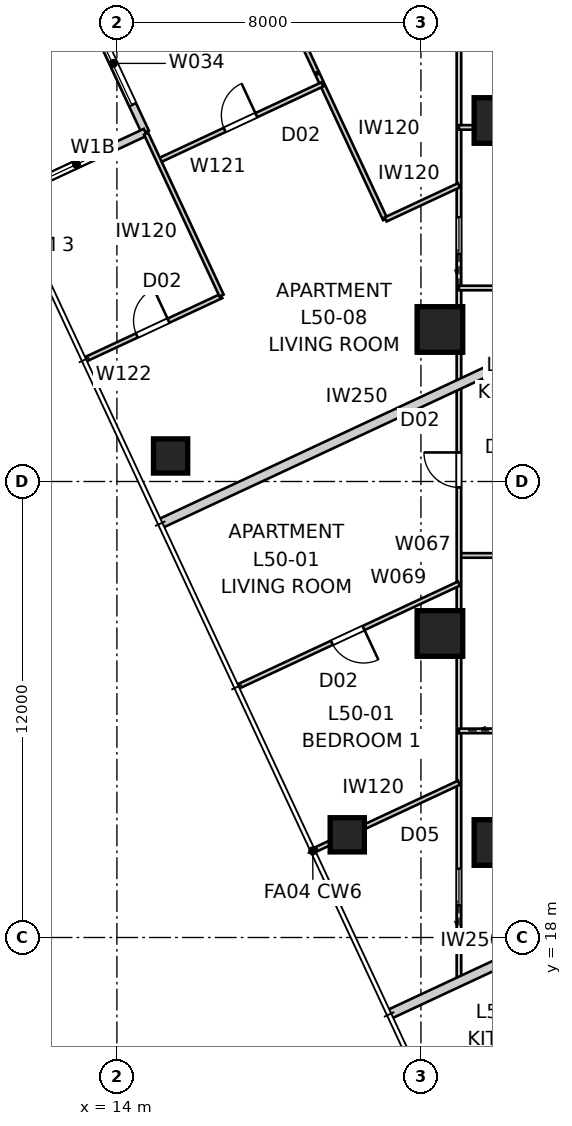
"""IFC4 building model, lengths in metres.
Left out: names, types, materials, properties, quantities, classifications, styles, units other than length and angle.
Written with IfcOpenShell. Run it as: python <this file> out.ifc"""

import sys

from ifc_helpers import new_model, si_unit, direction, frame, frame_2d, origin, origin_2d, place, context, subcontext, project, spatial, rectangle, extrude, element, fill, save


model = new_model("IFC4")
c1 = context("Model", 3, precision=1e-05, world=origin(), true_north=direction((0.0, 1.0)))
c2 = subcontext(c1, "Body", "Model", "MODEL_VIEW")
j1 = project(units=[si_unit("LENGTHUNIT", "METRE"), si_unit("PLANEANGLEUNIT", "RADIAN")], contexts=[c1])
p1 = place(None, origin())
s1 = spatial("IfcSite", under=j1, at=p1, CompositionType="ELEMENT")
p2 = place(p1, origin())
s2 = spatial("IfcBuilding", under=s1, at=p2, CompositionType="ELEMENT")
p3 = place(p2, frame((0.0, 0.0, 182.8)))
s3 = spatial("IfcBuildingStorey", under=s2, at=p3, CompositionType="ELEMENT", Elevation=182.8)
for number, where, z_axis, x_axis in (
    (1, (15.412, 30.672, 0.0), (0.0, 0.0, 1.0), (1.0, 0.0, 0.0)),
    (2, (20.061, 20.702, 0.0), (0.0, 0.0, 1.0), (1.0, 0.0, 0.0)),
):
    element("IfcColumn", number, at=place(p3, frame(where, z_axis=z_axis, x_axis=x_axis)), inside=s3, PredefinedType="COLUMN", context=c2, shape_type="SweptSolid", body=[
        extrude(rectangle(XDim=0.9, YDim=0.9, at=origin_2d()), origin(), (0.0, 0.0, 1.0), 3.4),
    ])
for number, where, z_axis, x_axis in (
    (3, (24.0, 39.5, 0.0), (0.0, 0.0, 1.0), (1.0, 0.0, 0.0)),
    (4, (22.5, 34.0, 0.0), (0.0, 0.0, 1.0), (1.0, 0.0, 0.0)),
    (5, (22.5, 26.0, 0.0), (0.0, 0.0, 1.0), (1.0, 0.0, 0.0)),
    (6, (24.0, 20.5, 0.0), (0.0, 0.0, 1.0), (1.0, 0.0, 0.0)),
):
    element("IfcColumn", number, at=place(p3, frame(where, z_axis=z_axis, x_axis=x_axis)), inside=s3, PredefinedType="COLUMN", context=c2, shape_type="SweptSolid", body=[
        extrude(rectangle(XDim=1.2, YDim=1.2, at=origin_2d()), origin(), (0.0, 0.0, 1.0), 3.4),
    ])
p4 = place(p3, frame((13.06, 42.815, 0.0), z_axis=(0.0, 0.0, 1.0), x_axis=(0.422658246362, -0.906289140828, 0.0)))
e7 = element("IfcWall", 7, at=p4, inside=s3, PredefinedType="SOLIDWALL", context=c2, shape_type="SweptSolid", body=[
    extrude(rectangle(XDim=4.0, YDim=0.2, at=frame_2d((2.0, 0.0))), origin(), (0.0, 0.0, 1.0), 3.25),
])
p5 = place(p4, frame((0.8, 0.0, 0.0)))
e8 = element("IfcOpeningElement", 8, at=p5, cuts=e7, PredefinedType="OPENING", context=c2, shape_type="SweptSolid", body=[
    extrude(rectangle(XDim=2.4, YDim=2.1, at=frame_2d((1.2, 1.05))), frame((0.0, 0.11, 0.0), z_axis=(0.0, -1.0, 0.0), x_axis=(1.0, 0.0, 0.0)), (0.0, 0.0, 1.0), 0.22),
])
p6 = place(p3, frame((14.75, 39.19, 0.0), z_axis=(0.0, 0.0, 1.0), x_axis=(-0.906289140828, -0.422658246362, 0.0)))
e9 = element("IfcWall", 9, at=p6, inside=s3, PredefinedType="SOLIDWALL", context=c2, shape_type="SweptSolid", body=[
    extrude(rectangle(XDim=4.0, YDim=0.2, at=frame_2d((2.0, 0.0))), origin(), (0.0, 0.0, 1.0), 3.25),
])
p7 = place(p6, frame((1.0, 0.0, 0.45)))
e10 = element("IfcOpeningElement", 10, at=p7, cuts=e9, PredefinedType="OPENING", context=c2, shape_type="SweptSolid", body=[
    extrude(rectangle(XDim=2.0, YDim=1.8, at=frame_2d((1.0, 0.9))), frame((0.0, 0.11, 0.0), z_axis=(0.0, -1.0, 0.0), x_axis=(1.0, 0.0, 0.0)), (0.0, 0.0, 1.0), 0.22),
])
p8 = place(p3, frame((15.14, 28.89, 0.0), z_axis=(0.0, 0.0, 1.0), x_axis=(0.906303906082, 0.422626584374, 0.0)))
e11 = element("IfcWall", 11, at=p8, inside=s3, PredefinedType="PARTITIONING", context=c2, shape_type="SweptSolid", body=[
    extrude(rectangle(XDim=12.185, YDim=0.25, at=frame_2d((6.092, 0.0))), origin(), (0.0, 0.0, 1.0), 3.25),
])
p9 = place(p3, frame((21.162, 15.975, 0.0), z_axis=(0.0, 0.0, 1.0), x_axis=(0.906309193024, 0.422615246577, 0.0)))
e12 = element("IfcWall", 12, at=p9, inside=s3, PredefinedType="PARTITIONING", context=c2, shape_type="SweptSolid", body=[
    extrude(rectangle(XDim=5.54, YDim=0.25, at=frame_2d((2.77, 0.0))), origin(), (0.0, 0.0, 1.0), 3.25),
])
p10 = place(p3, frame((26.2, 28.054, 0.0), z_axis=(0.0, 0.0, 1.0), x_axis=(-1.0, 0.0, 0.0)))
e13 = element("IfcWall", 13, at=p10, inside=s3, PredefinedType="PARTITIONING", context=c2, shape_type="SweptSolid", body=[
    extrude(rectangle(XDim=3.2, YDim=0.12, at=frame_2d((1.6, 0.0))), origin(), (0.0, 0.0, 1.0), 3.25),
])
p11 = place(p10, frame((1.12, 0.0, 0.0)))
e14 = element("IfcOpeningElement", 14, at=p11, cuts=e13, PredefinedType="OPENING", context=c2, shape_type="SweptSolid", body=[
    extrude(rectangle(XDim=0.96, YDim=2.1, at=frame_2d((0.48, 1.05))), frame((0.0, 0.07, 0.0), z_axis=(0.0, -1.0, 0.0), x_axis=(1.0, 0.0, 0.0)), (0.0, 0.0, 1.0), 0.14),
])
p12 = place(p3, frame((23.0, 16.832, 0.0), z_axis=(0.0, 0.0, 1.0), x_axis=(0.0, 1.0, 0.0)))
e15 = element("IfcWall", 15, at=p12, inside=s3, PredefinedType="PARTITIONING", context=c2, shape_type="SweptSolid", body=[
    extrude(rectangle(XDim=30.574, YDim=0.12, at=frame_2d((15.287, 0.0))), origin(), (0.0, 0.0, 1.0), 2.55),
])
p13 = place(p12, frame((26.093, 0.0, 0.0)))
e16 = element("IfcOpeningElement", 16, at=p13, cuts=e15, PredefinedType="OPENING", context=c2, shape_type="SweptSolid", body=[
    extrude(rectangle(XDim=0.92, YDim=2.34, at=frame_2d((0.46, 1.17))), frame((0.0, 0.07, 0.0), z_axis=(0.0, -1.0, 0.0), x_axis=(1.0, 0.0, 0.0)), (0.0, 0.0, 1.0), 0.14),
])
p14 = place(p12, frame((13.012, 0.0, 0.0)))
e17 = element("IfcOpeningElement", 17, at=p14, cuts=e15, PredefinedType="OPENING", context=c2, shape_type="SweptSolid", body=[
    extrude(rectangle(XDim=0.92, YDim=2.34, at=frame_2d((0.46, 1.17))), frame((0.0, 0.07, 0.0), z_axis=(0.0, -1.0, 0.0), x_axis=(1.0, 0.0, 0.0)), (0.0, 0.0, 1.0), 0.14),
])
p15 = place(p12, frame((19.16, 0.0, 0.0)))
e18 = element("IfcOpeningElement", 18, at=p15, cuts=e15, PredefinedType="OPENING", context=c2, shape_type="SweptSolid", body=[
    extrude(rectangle(XDim=0.96, YDim=2.1, at=frame_2d((0.48, 1.05))), frame((0.0, 0.07, 0.0), z_axis=(0.0, -1.0, 0.0), x_axis=(1.0, 0.0, 0.0)), (0.0, 0.0, 1.0), 0.14),
])
p16 = place(p12, frame((2.018, 0.0, 0.0)))
e19 = element("IfcOpeningElement", 19, at=p16, cuts=e15, PredefinedType="OPENING", context=c2, shape_type="SweptSolid", body=[
    extrude(rectangle(XDim=0.96, YDim=2.1, at=frame_2d((0.48, 1.05))), frame((0.0, 0.07, 0.0), z_axis=(0.0, -1.0, 0.0), x_axis=(1.0, 0.0, 0.0)), (0.0, 0.0, 1.0), 0.14),
])
p17 = place(p3, frame((23.0, 23.436, 0.0), z_axis=(0.0, 0.0, 1.0), x_axis=(1.0, 0.0, 0.0)))
e20 = element("IfcWall", 20, at=p17, inside=s3, PredefinedType="PARTITIONING", context=c2, shape_type="SweptSolid", body=[
    extrude(rectangle(XDim=3.2, YDim=0.12, at=frame_2d((1.6, 0.0))), origin(), (0.0, 0.0, 1.0), 3.25),
])
p18 = place(p17, frame((1.12, 0.0, 0.0)))
e21 = element("IfcOpeningElement", 21, at=p18, cuts=e20, PredefinedType="OPENING", context=c2, shape_type="SweptSolid", body=[
    extrude(rectangle(XDim=0.96, YDim=2.1, at=frame_2d((0.48, 1.05))), frame((0.0, 0.07, 0.0), z_axis=(0.0, -1.0, 0.0), x_axis=(1.0, 0.0, 0.0)), (0.0, 0.0, 1.0), 0.14),
])
p19 = place(p3, frame((23.0, 27.314, 0.0), z_axis=(0.0, 0.0, 1.0), x_axis=(-0.906305562553, -0.422623032129, 0.0)))
e22 = element("IfcWall", 22, at=p19, inside=s3, PredefinedType="PARTITIONING", context=c2, shape_type="SweptSolid", body=[
    extrude(rectangle(XDim=6.417, YDim=0.12, at=frame_2d((3.209, 0.0))), origin(), (0.0, 0.0, 1.0), 3.25),
])
p20 = place(p19, frame((2.769, 0.0, 0.0)))
e23 = element("IfcOpeningElement", 23, at=p20, cuts=e22, PredefinedType="OPENING", context=c2, shape_type="SweptSolid", body=[
    extrude(rectangle(XDim=0.92, YDim=2.34, at=frame_2d((0.46, 1.17))), frame((0.0, 0.07, 0.0), z_axis=(0.0, -1.0, 0.0), x_axis=(1.0, 0.0, 0.0)), (0.0, 0.0, 1.0), 0.14),
])
p21 = place(p3, frame((23.0, 22.073, 0.0), z_axis=(0.0, 0.0, 1.0), x_axis=(-0.906304800396, -0.422624666552, 0.0)))
e24 = element("IfcWall", 24, at=p21, inside=s3, PredefinedType="PARTITIONING", context=c2, shape_type="SweptSolid", body=[
    extrude(rectangle(XDim=4.203, YDim=0.12, at=frame_2d((2.101, 0.0))), origin(), (0.0, 0.0, 1.0), 3.25),
])
p22 = place(p3, frame((26.2, 39.318, 0.0), z_axis=(0.0, 0.0, 1.0), x_axis=(-1.0, 0.0, 0.0)))
e25 = element("IfcWall", 25, at=p22, inside=s3, PredefinedType="PARTITIONING", context=c2, shape_type="SweptSolid", body=[
    extrude(rectangle(XDim=3.2, YDim=0.12, at=frame_2d((1.6, 0.0))), origin(), (0.0, 0.0, 1.0), 3.25),
])
p23 = place(p22, frame((0.52, 0.0, 0.0)))
e26 = element("IfcOpeningElement", 26, at=p23, cuts=e25, PredefinedType="OPENING", context=c2, shape_type="SweptSolid", body=[
    extrude(rectangle(XDim=0.96, YDim=2.1, at=frame_2d((0.48, 1.05))), frame((0.0, 0.07, 0.0), z_axis=(0.0, -1.0, 0.0), x_axis=(1.0, 0.0, 0.0)), (0.0, 0.0, 1.0), 0.14),
])
p24 = place(p3, frame((26.2, 35.092, 0.0), z_axis=(0.0, 0.0, 1.0), x_axis=(-1.0, 0.0, 0.0)))
e27 = element("IfcWall", 27, at=p24, inside=s3, PredefinedType="PARTITIONING", context=c2, shape_type="SweptSolid", body=[
    extrude(rectangle(XDim=3.2, YDim=0.12, at=frame_2d((1.6, 0.0))), origin(), (0.0, 0.0, 1.0), 3.25),
])
p25 = place(p24, frame((1.12, 0.0, 0.0)))
e28 = element("IfcOpeningElement", 28, at=p25, cuts=e27, PredefinedType="OPENING", context=c2, shape_type="SweptSolid", body=[
    extrude(rectangle(XDim=0.96, YDim=2.1, at=frame_2d((0.48, 1.05))), frame((0.0, 0.07, 0.0), z_axis=(0.0, -1.0, 0.0), x_axis=(1.0, 0.0, 0.0)), (0.0, 0.0, 1.0), 0.14),
])
p26 = place(p3, frame((19.279, 40.718, 0.0), z_axis=(0.0, 0.0, 1.0), x_axis=(0.422625167194, -0.906304566939, 0.0)))
e29 = element("IfcWall", 29, at=p26, inside=s3, PredefinedType="PARTITIONING", context=c2, shape_type="SweptSolid", body=[
    extrude(rectangle(XDim=4.211, YDim=0.12, at=frame_2d((2.105, 0.0))), origin(), (0.0, 0.0, 1.0), 3.25),
])
p27 = place(p3, frame((21.072, 36.897, 0.0), z_axis=(0.0, 0.0, 1.0), x_axis=(0.90630329877, 0.422627886727, 0.0)))
e30 = element("IfcWall", 30, at=p27, inside=s3, PredefinedType="PARTITIONING", context=c2, shape_type="SweptSolid", body=[
    extrude(rectangle(XDim=2.128, YDim=0.12, at=frame_2d((1.064, 0.0))), origin(), (0.0, 0.0, 1.0), 3.25),
])
p28 = place(p3, frame((15.099, 38.442, 0.0), z_axis=(0.0, 0.0, 1.0), x_axis=(0.906306539388, 0.422620937321, 0.0)))
e31 = element("IfcWall", 31, at=p28, inside=s3, PredefinedType="PARTITIONING", context=c2, shape_type="SweptSolid", body=[
    extrude(rectangle(XDim=4.75, YDim=0.12, at=frame_2d((2.375, 0.0))), origin(), (0.0, 0.0, 1.0), 3.25),
])
p29 = place(p28, frame((1.915, 0.0, 0.0)))
e32 = element("IfcOpeningElement", 32, at=p29, cuts=e31, PredefinedType="OPENING", context=c2, shape_type="SweptSolid", body=[
    extrude(rectangle(XDim=0.92, YDim=2.34, at=frame_2d((0.46, 1.17))), frame((0.0, 0.07, 0.0), z_axis=(0.0, -1.0, 0.0), x_axis=(1.0, 0.0, 0.0)), (0.0, 0.0, 1.0), 0.14),
])
p30 = place(p3, frame((13.169, 33.211, 0.0), z_axis=(0.0, 0.0, 1.0), x_axis=(0.9062952203, 0.422645210149, 0.0)))
e33 = element("IfcWall", 33, at=p30, inside=s3, PredefinedType="PARTITIONING", context=c2, shape_type="SweptSolid", body=[
    extrude(rectangle(XDim=3.95, YDim=0.12, at=frame_2d((1.975, 0.0))), origin(), (0.0, 0.0, 1.0), 3.25),
])
p31 = place(p30, frame((1.495, 0.0, 0.0)))
e34 = element("IfcOpeningElement", 34, at=p31, cuts=e33, PredefinedType="OPENING", context=c2, shape_type="SweptSolid", body=[
    extrude(rectangle(XDim=0.92, YDim=2.34, at=frame_2d((0.46, 1.17))), frame((0.0, 0.07, 0.0), z_axis=(0.0, -1.0, 0.0), x_axis=(1.0, 0.0, 0.0)), (0.0, 0.0, 1.0), 0.14),
])
p32 = place(p3, frame((16.754, 34.894, 0.0), z_axis=(0.0, 0.0, 1.0), x_axis=(-0.42256979057, 0.906330387937, 0.0)))
e35 = element("IfcWall", 35, at=p32, inside=s3, PredefinedType="PARTITIONING", context=c2, shape_type="SweptSolid", body=[
    extrude(rectangle(XDim=4.7, YDim=0.12, at=frame_2d((2.35, 0.0))), origin(), (0.0, 0.0, 1.0), 3.25),
])
p33 = place(p3, frame((19.256, 40.767, 0.0), z_axis=(0.0, 0.0, 1.0), x_axis=(-0.42260518136, 0.906313886403, 0.0)))
e36 = element("IfcWall", 36, at=p33, inside=s3, PredefinedType="PARTITIONING", context=c2, shape_type="SweptSolid", body=[
    extrude(rectangle(XDim=4.435, YDim=0.12, at=frame_2d((2.218, 0.0))), origin(), (0.0, 0.0, 1.0), 3.25),
])
p34 = place(p5, origin())
e37 = element("IfcDoor", 37, at=p34, inside=s3, OperationType="SLIDING_TO_LEFT", PredefinedType="DOOR", context=c2, shape_type="SweptSolid", body=[
    extrude(rectangle(XDim=2.4, YDim=2.1, at=frame_2d((1.2, 1.05))), frame((0.0, 0.025, 0.0), z_axis=(0.0, -1.0, 0.0), x_axis=(1.0, 0.0, 0.0)), (0.0, 0.0, 1.0), 0.05),
])
fill(e8, e37)
p35 = place(p7, origin())
e38 = element("IfcWindow", 38, at=p35, inside=s3, PartitioningType="SINGLE_PANEL", PredefinedType="WINDOW", context=c2, shape_type="SweptSolid", body=[
    extrude(rectangle(XDim=2.0, YDim=1.8, at=frame_2d((1.0, 0.9))), frame((0.0, 0.03, 0.0), z_axis=(0.0, -1.0, 0.0), x_axis=(1.0, 0.0, 0.0)), (0.0, 0.0, 1.0), 0.06),
])
fill(e10, e38)
p36 = place(p14, origin())
e39 = element("IfcDoor", 39, at=p36, inside=s3, OperationType="SINGLE_SWING_RIGHT", PredefinedType="DOOR", context=c2, shape_type="SweptSolid", body=[
    extrude(rectangle(XDim=0.92, YDim=2.34, at=frame_2d((0.46, 1.17))), frame((0.0, 0.025, 0.0), z_axis=(0.0, -1.0, 0.0), x_axis=(1.0, 0.0, 0.0)), (0.0, 0.0, 1.0), 0.05),
])
fill(e17, e39)
p37 = place(p15, origin())
e40 = element("IfcDoor", 40, at=p37, inside=s3, OperationType="SLIDING_TO_LEFT", PredefinedType="DOOR", context=c2, shape_type="SweptSolid", body=[
    extrude(rectangle(XDim=0.96, YDim=2.1, at=frame_2d((0.48, 1.05))), frame((0.0, 0.025, 0.0), z_axis=(0.0, -1.0, 0.0), x_axis=(1.0, 0.0, 0.0)), (0.0, 0.0, 1.0), 0.05),
])
fill(e18, e40)
p38 = place(p20, origin())
e41 = element("IfcDoor", 41, at=p38, inside=s3, OperationType="SINGLE_SWING_LEFT", PredefinedType="DOOR", context=c2, shape_type="SweptSolid", body=[
    extrude(rectangle(XDim=0.92, YDim=2.34, at=frame_2d((0.46, 1.17))), frame((0.0, 0.025, 0.0), z_axis=(0.0, -1.0, 0.0), x_axis=(1.0, 0.0, 0.0)), (0.0, 0.0, 1.0), 0.05),
])
fill(e23, e41)
p39 = place(p29, origin())
e42 = element("IfcDoor", 42, at=p39, inside=s3, OperationType="SINGLE_SWING_RIGHT", PredefinedType="DOOR", context=c2, shape_type="SweptSolid", body=[
    extrude(rectangle(XDim=0.92, YDim=2.34, at=frame_2d((0.46, 1.17))), frame((0.0, 0.025, 0.0), z_axis=(0.0, -1.0, 0.0), x_axis=(1.0, 0.0, 0.0)), (0.0, 0.0, 1.0), 0.05),
])
fill(e32, e42)
p40 = place(p31, origin())
e43 = element("IfcDoor", 43, at=p40, inside=s3, OperationType="SINGLE_SWING_RIGHT", PredefinedType="DOOR", context=c2, shape_type="SweptSolid", body=[
    extrude(rectangle(XDim=0.92, YDim=2.34, at=frame_2d((0.46, 1.17))), frame((0.0, 0.025, 0.0), z_axis=(0.0, -1.0, 0.0), x_axis=(1.0, 0.0, 0.0)), (0.0, 0.0, 1.0), 0.05),
])
fill(e34, e43)
p41 = place(p16, origin())
e44 = element("IfcDoor", 44, at=p41, inside=s3, OperationType="SLIDING_TO_LEFT", PredefinedType="DOOR", context=c2, shape_type="SweptSolid", body=[
    extrude(rectangle(XDim=0.96, YDim=2.1, at=frame_2d((0.48, 1.05))), frame((0.0, 0.025, 0.0), z_axis=(0.0, -1.0, 0.0), x_axis=(1.0, 0.0, 0.0)), (0.0, 0.0, 1.0), 0.05),
])
fill(e19, e44)
save(model, sys.argv[1])
